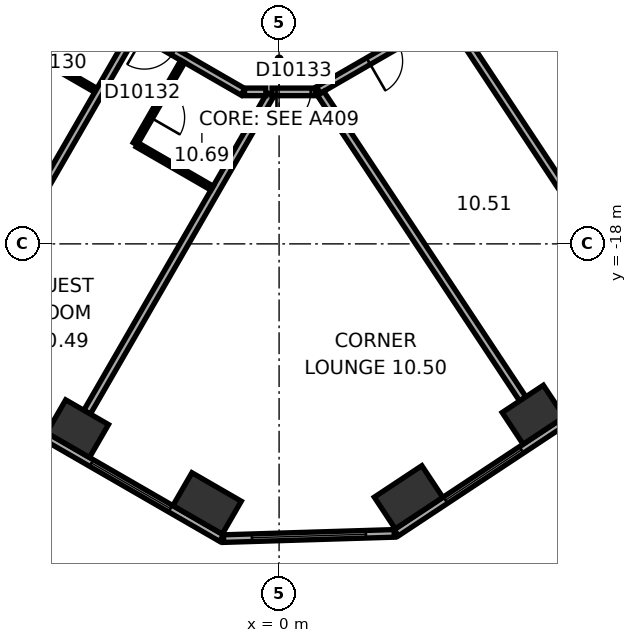
"""IFC4 building model, lengths in metres.
Left out: names, types, materials, properties, quantities, classifications, styles, units other than length and angle.
Written with IfcOpenShell. Run it as: python <this file> out.ifc"""

import sys

from ifc_helpers import new_model, si_unit, direction, frame, frame_2d, origin, origin_2d, place, context, subcontext, project, spatial, rectangle, extrude, element, fill, save


model = new_model("IFC4")
c1 = context("Model", 3, precision=1e-05, world=origin(), true_north=direction((0.0, 1.0)))
c2 = subcontext(c1, "Body", "Model", "MODEL_VIEW")
j1 = project(units=[si_unit("LENGTHUNIT", "METRE"), si_unit("PLANEANGLEUNIT", "RADIAN")], contexts=[c1])
p1 = place(None, origin())
s1 = spatial("IfcSite", under=j1, at=p1, CompositionType="ELEMENT")
p2 = place(p1, origin())
s2 = spatial("IfcBuilding", under=s1, at=p2, CompositionType="ELEMENT")
p3 = place(p2, frame((0.0, 0.0, 53.9)))
s3 = spatial("IfcBuildingStorey", under=s2, at=p3, CompositionType="ELEMENT", Elevation=53.9)
p4 = place(p3, frame((-5.302, -22.862, 0.0), z_axis=(0.0, 0.0, 1.0), x_axis=(0.866025403784, -0.5, 0.0)))
e1 = element("IfcColumn", 1, at=p4, inside=s3, PredefinedType="COLUMN", context=c2, shape_type="SweptSolid", body=[
    extrude(rectangle(XDim=1.3, YDim=1.0, at=origin_2d()), origin(), (0.0, 0.0, 1.0), 3.3),
])
for number, where, z_axis, x_axis in (
    (2, (-1.895, -24.829, 0.0), (0.0, 0.0, 1.0), (0.866, -0.5, 0.0)),
    (3, (3.407, -24.667, 0.0), (0.0, 0.0, 1.0), (0.834, 0.552, 0.0)),
):
    element("IfcColumn", number, at=place(p3, frame(where, z_axis=z_axis, x_axis=x_axis)), inside=s3, PredefinedType="COLUMN", context=c2, shape_type="SweptSolid", body=[
        extrude(rectangle(XDim=1.5, YDim=1.0, at=origin_2d()), origin(), (0.0, 0.0, 1.0), 3.3),
    ])
p5 = place(p3, frame((6.688, -22.496, 0.0), z_axis=(0.0, 0.0, 1.0), x_axis=(0.833885822067, 0.551936985312, 0.0)))
e4 = element("IfcColumn", 4, at=p5, inside=s3, PredefinedType="COLUMN", context=c2, shape_type="SweptSolid", body=[
    extrude(rectangle(XDim=1.3, YDim=1.0, at=origin_2d()), origin(), (0.0, 0.0, 1.0), 3.3),
])
p6 = place(p3, frame((-19.914, -15.119, 0.0), z_axis=(0.0, 0.0, 1.0), x_axis=(0.866025418898, -0.499999973822, 0.0)))
e5 = element("IfcWall", 5, at=p6, inside=s3, PredefinedType="STANDARD", context=c2, shape_type="SweptSolid", body=[
    extrude(rectangle(XDim=21.246, YDim=0.2, at=frame_2d((10.623, 0.0))), origin(), (0.0, 0.0, 1.0), 3.3),
])
p7 = place(p6, frame((1.555, 0.0, 0.8)))
e6 = element("IfcOpeningElement", 6, at=p7, cuts=e5, PredefinedType="OPENING", context=c2, shape_type="SweptSolid", body=[
    extrude(rectangle(XDim=2.4, YDim=1.7, at=frame_2d((1.2, 0.85))), frame((0.0, 0.11, 0.0), z_axis=(0.0, -1.0, 0.0), x_axis=(1.0, 0.0, 0.0)), (0.0, 0.0, 1.0), 0.22),
])
p8 = place(p6, frame((5.489, 0.0, 0.8)))
e7 = element("IfcOpeningElement", 7, at=p8, cuts=e5, PredefinedType="OPENING", context=c2, shape_type="SweptSolid", body=[
    extrude(rectangle(XDim=2.4, YDim=1.7, at=frame_2d((1.2, 0.85))), frame((0.0, 0.11, 0.0), z_axis=(0.0, -1.0, 0.0), x_axis=(1.0, 0.0, 0.0)), (0.0, 0.0, 1.0), 0.22),
])
p9 = place(p6, frame((9.424, 0.0, 0.8)))
e8 = element("IfcOpeningElement", 8, at=p9, cuts=e5, PredefinedType="OPENING", context=c2, shape_type="SweptSolid", body=[
    extrude(rectangle(XDim=2.4, YDim=1.7, at=frame_2d((1.2, 0.85))), frame((0.0, 0.11, 0.0), z_axis=(0.0, -1.0, 0.0), x_axis=(1.0, 0.0, 0.0)), (0.0, 0.0, 1.0), 0.22),
])
p10 = place(p6, frame((13.358, 0.0, 0.8)))
e9 = element("IfcOpeningElement", 9, at=p10, cuts=e5, PredefinedType="OPENING", context=c2, shape_type="SweptSolid", body=[
    extrude(rectangle(XDim=2.4, YDim=1.7, at=frame_2d((1.2, 0.85))), frame((0.0, 0.11, 0.0), z_axis=(0.0, -1.0, 0.0), x_axis=(1.0, 0.0, 0.0)), (0.0, 0.0, 1.0), 0.22),
])
p11 = place(p6, frame((17.293, 0.0, 0.8)))
e10 = element("IfcOpeningElement", 10, at=p11, cuts=e5, PredefinedType="OPENING", context=c2, shape_type="SweptSolid", body=[
    extrude(rectangle(XDim=2.4, YDim=1.7, at=frame_2d((1.2, 0.85))), frame((0.0, 0.11, 0.0), z_axis=(0.0, -1.0, 0.0), x_axis=(1.0, 0.0, 0.0)), (0.0, 0.0, 1.0), 0.22),
])
p12 = place(p3, frame((-1.461, -25.755, 0.0), z_axis=(0.0, 0.0, 1.0), x_axis=(0.999533823446, 0.030530898895, 0.0)))
e11 = element("IfcWall", 11, at=p12, inside=s3, PredefinedType="STANDARD", context=c2, shape_type="SweptSolid", body=[
    extrude(rectangle(XDim=4.494, YDim=0.2, at=frame_2d((2.247, 0.0))), origin(), (0.0, 0.0, 1.0), 3.3),
])
p13 = place(p12, frame((0.747, 0.0, 0.8)))
e12 = element("IfcOpeningElement", 12, at=p13, cuts=e11, PredefinedType="OPENING", context=c2, shape_type="SweptSolid", body=[
    extrude(rectangle(XDim=3.0, YDim=1.7, at=frame_2d((1.5, 0.85))), frame((0.0, 0.11, 0.0), z_axis=(0.0, -1.0, 0.0), x_axis=(1.0, 0.0, 0.0)), (0.0, 0.0, 1.0), 0.22),
])
p14 = place(p3, frame((3.083, -25.601, 0.0), z_axis=(0.0, 0.0, 1.0), x_axis=(0.833884295743, 0.551939291329, 0.0)))
e13 = element("IfcWall", 13, at=p14, inside=s3, PredefinedType="STANDARD", context=c2, shape_type="SweptSolid", body=[
    extrude(rectangle(XDim=21.246, YDim=0.2, at=frame_2d((10.623, 0.0))), origin(), (0.0, 0.0, 1.0), 3.3),
])
p15 = place(p14, frame((1.553, 0.0, 0.8)))
e14 = element("IfcOpeningElement", 14, at=p15, cuts=e13, PredefinedType="OPENING", context=c2, shape_type="SweptSolid", body=[
    extrude(rectangle(XDim=2.4, YDim=1.7, at=frame_2d((1.2, 0.85))), frame((0.0, 0.11, 0.0), z_axis=(0.0, -1.0, 0.0), x_axis=(1.0, 0.0, 0.0)), (0.0, 0.0, 1.0), 0.22),
])
p16 = place(p14, frame((5.488, 0.0, 0.8)))
e15 = element("IfcOpeningElement", 15, at=p16, cuts=e13, PredefinedType="OPENING", context=c2, shape_type="SweptSolid", body=[
    extrude(rectangle(XDim=2.4, YDim=1.7, at=frame_2d((1.2, 0.85))), frame((0.0, 0.11, 0.0), z_axis=(0.0, -1.0, 0.0), x_axis=(1.0, 0.0, 0.0)), (0.0, 0.0, 1.0), 0.22),
])
p17 = place(p14, frame((9.422, 0.0, 0.8)))
e16 = element("IfcOpeningElement", 16, at=p17, cuts=e13, PredefinedType="OPENING", context=c2, shape_type="SweptSolid", body=[
    extrude(rectangle(XDim=2.4, YDim=1.7, at=frame_2d((1.2, 0.85))), frame((0.0, 0.11, 0.0), z_axis=(0.0, -1.0, 0.0), x_axis=(1.0, 0.0, 0.0)), (0.0, 0.0, 1.0), 0.22),
])
p18 = place(p14, frame((13.357, 0.0, 0.8)))
e17 = element("IfcOpeningElement", 17, at=p18, cuts=e13, PredefinedType="OPENING", context=c2, shape_type="SweptSolid", body=[
    extrude(rectangle(XDim=2.4, YDim=1.7, at=frame_2d((1.2, 0.85))), frame((0.0, 0.11, 0.0), z_axis=(0.0, -1.0, 0.0), x_axis=(1.0, 0.0, 0.0)), (0.0, 0.0, 1.0), 0.22),
])
p19 = place(p14, frame((17.291, 0.0, 0.8)))
e18 = element("IfcOpeningElement", 18, at=p19, cuts=e13, PredefinedType="OPENING", context=c2, shape_type="SweptSolid", body=[
    extrude(rectangle(XDim=2.4, YDim=1.7, at=frame_2d((1.2, 0.85))), frame((0.0, 0.11, 0.0), z_axis=(0.0, -1.0, 0.0), x_axis=(1.0, 0.0, 0.0)), (0.0, 0.0, 1.0), 0.22),
])
p20 = place(p3, frame((-11.615, -7.843, 0.0), z_axis=(0.0, 0.0, 1.0), x_axis=(0.866026466995, -0.499998158461, 0.0)))
e19 = element("IfcWall", 19, at=p20, inside=s3, PredefinedType="PARTITIONING", context=c2, shape_type="SweptSolid", body=[
    extrude(rectangle(XDim=12.315, YDim=0.2, at=frame_2d((6.158, 0.0))), origin(), (0.0, 0.0, 1.0), 3.05),
])
p21 = place(p20, frame((4.608, 0.0, 0.0)))
e20 = element("IfcOpeningElement", 20, at=p21, cuts=e19, PredefinedType="OPENING", context=c2, shape_type="SweptSolid", body=[
    extrude(rectangle(XDim=1.0, YDim=2.1, at=frame_2d((0.5, 1.05))), frame((0.0, 0.11, 0.0), z_axis=(0.0, -1.0, 0.0), x_axis=(1.0, 0.0, 0.0)), (0.0, 0.0, 1.0), 0.22),
])
p22 = place(p20, frame((9.317, 0.0, 0.0)))
e21 = element("IfcOpeningElement", 21, at=p22, cuts=e19, PredefinedType="OPENING", context=c2, shape_type="SweptSolid", body=[
    extrude(rectangle(XDim=0.9, YDim=2.1, at=frame_2d((0.45, 1.05))), frame((0.0, 0.11, 0.0), z_axis=(0.0, -1.0, 0.0), x_axis=(1.0, 0.0, 0.0)), (0.0, 0.0, 1.0), 0.22),
])
p23 = place(p3, frame((-11.463, -10.125, 0.0), z_axis=(0.0, 0.0, 1.0), x_axis=(0.866014882148, -0.500018223566, 0.0)))
e22 = element("IfcWall", 22, at=p23, inside=s3, PredefinedType="PARTITIONING", context=c2, shape_type="SweptSolid", body=[
    extrude(rectangle(XDim=7.669, YDim=0.12, at=frame_2d((3.834, 0.0))), origin(), (0.0, 0.0, 1.0), 3.05),
])
p24 = place(p23, frame((0.55, 0.0, 0.0)))
e23 = element("IfcOpeningElement", 23, at=p24, cuts=e22, PredefinedType="OPENING", context=c2, shape_type="SweptSolid", body=[
    extrude(rectangle(XDim=1.0, YDim=2.1, at=frame_2d((0.5, 1.05))), frame((0.0, 0.07, 0.0), z_axis=(0.0, -1.0, 0.0), x_axis=(1.0, 0.0, 0.0)), (0.0, 0.0, 1.0), 0.14),
])
p25 = place(p23, frame((2.7, 0.0, 0.0)))
e24 = element("IfcOpeningElement", 24, at=p25, cuts=e22, PredefinedType="OPENING", context=c2, shape_type="SweptSolid", body=[
    extrude(rectangle(XDim=0.9, YDim=2.1, at=frame_2d((0.45, 1.05))), frame((0.0, 0.07, 0.0), z_axis=(0.0, -1.0, 0.0), x_axis=(1.0, 0.0, 0.0)), (0.0, 0.0, 1.0), 0.14),
])
p26 = place(p23, frame((5.485, 0.0, 0.0)))
e25 = element("IfcOpeningElement", 25, at=p26, cuts=e22, PredefinedType="OPENING", context=c2, shape_type="SweptSolid", body=[
    extrude(rectangle(XDim=0.9, YDim=2.1, at=frame_2d((0.45, 1.05))), frame((0.0, 0.07, 0.0), z_axis=(0.0, -1.0, 0.0), x_axis=(1.0, 0.0, 0.0)), (0.0, 0.0, 1.0), 0.14),
])
p27 = place(p3, frame((-8.46, -20.461, 0.0), z_axis=(0.0, 0.0, 1.0), x_axis=(0.499999662836, 0.866025598446, 0.0)))
e26 = element("IfcWall", 26, at=p27, inside=s3, PredefinedType="PARTITIONING", context=c2, shape_type="SweptSolid", body=[
    extrude(rectangle(XDim=9.25, YDim=0.2, at=frame_2d((4.625, 0.0))), origin(), (0.0, 0.0, 1.0), 3.05),
])
p28 = place(p3, frame((-5.052, -22.429, 0.0), z_axis=(0.0, 0.0, 1.0), x_axis=(0.50000569793, 0.866022114058, 0.0)))
e27 = element("IfcWall", 27, at=p28, inside=s3, PredefinedType="PARTITIONING", context=c2, shape_type="SweptSolid", body=[
    extrude(rectangle(XDim=9.65, YDim=0.2, at=frame_2d((4.825, 0.0))), origin(), (0.0, 0.0, 1.0), 3.05),
])
p29 = place(p3, frame((-3.786, -15.366, 0.0), z_axis=(0.0, 0.0, 1.0), x_axis=(0.500004234368, 0.866022959057, 0.0)))
e28 = element("IfcWall", 28, at=p29, inside=s3, PredefinedType="PARTITIONING", context=c2, shape_type="SweptSolid", body=[
    extrude(rectangle(XDim=2.5, YDim=0.12, at=frame_2d((1.25, 0.0))), origin(), (0.0, 0.0, 1.0), 3.05),
])
p30 = place(p29, frame((0.8, 0.0, 0.0)))
e29 = element("IfcOpeningElement", 29, at=p30, cuts=e28, PredefinedType="OPENING", context=c2, shape_type="SweptSolid", body=[
    extrude(rectangle(XDim=0.9, YDim=2.1, at=frame_2d((0.45, 1.05))), frame((0.0, 0.07, 0.0), z_axis=(0.0, -1.0, 0.0), x_axis=(1.0, 0.0, 0.0)), (0.0, 0.0, 1.0), 0.14),
])
p31 = place(p3, frame((-1.764, -16.533, 0.0), z_axis=(0.0, 0.0, 1.0), x_axis=(-0.866008641419, 0.500029032144, 0.0)))
e30 = element("IfcWall", 30, at=p31, inside=s3, PredefinedType="PARTITIONING", context=c2, shape_type="SweptSolid", body=[
    extrude(rectangle(XDim=2.275, YDim=0.12, at=frame_2d((1.137, 0.0))), origin(), (0.0, 0.0, 1.0), 3.05),
])
p32 = place(p3, frame((-0.91, -14.001, 0.0), z_axis=(0.0, 0.0, 1.0), x_axis=(1.0, 0.0, 0.0)))
e31 = element("IfcWall", 31, at=p32, inside=s3, PredefinedType="PARTITIONING", context=c2, shape_type="SweptSolid", body=[
    extrude(rectangle(XDim=0.56, YDim=0.2, at=frame_2d((0.28, 0.0))), origin(), (0.0, 0.0, 1.0), 3.05),
])
p33 = place(p3, frame((-0.186, -14.001, 0.0), z_axis=(0.0, 0.0, 1.0), x_axis=(1.0, 0.0, 0.0)))
e32 = element("IfcWall", 32, at=p33, inside=s3, PredefinedType="PARTITIONING", context=c2, shape_type="SweptSolid", body=[
    extrude(rectangle(XDim=1.136, YDim=0.2, at=frame_2d((0.568, 0.0))), origin(), (0.0, 0.0, 1.0), 3.05),
])
p34 = place(p33, frame((0.118, 0.0, 0.0)))
e33 = element("IfcOpeningElement", 33, at=p34, cuts=e32, PredefinedType="OPENING", context=c2, shape_type="SweptSolid", body=[
    extrude(rectangle(XDim=0.9, YDim=2.1, at=frame_2d((0.45, 1.05))), frame((0.0, 0.11, 0.0), z_axis=(0.0, -1.0, 0.0), x_axis=(1.0, 0.0, 0.0)), (0.0, 0.0, 1.0), 0.22),
])
p35 = place(p3, frame((1.033, -13.953, 0.0), z_axis=(0.0, 0.0, 1.0), x_axis=(0.866017531406, 0.500013635111, 0.0)))
e34 = element("IfcWall", 34, at=p35, inside=s3, PredefinedType="PARTITIONING", context=c2, shape_type="SweptSolid", body=[
    extrude(rectangle(XDim=6.58, YDim=0.2, at=frame_2d((3.29, 0.0))), origin(), (0.0, 0.0, 1.0), 3.05),
])
p36 = place(p35, frame((1.521, 0.0, 0.0)))
e35 = element("IfcOpeningElement", 35, at=p36, cuts=e34, PredefinedType="OPENING", context=c2, shape_type="SweptSolid", body=[
    extrude(rectangle(XDim=0.9, YDim=2.1, at=frame_2d((0.45, 1.05))), frame((0.0, 0.11, 0.0), z_axis=(0.0, -1.0, 0.0), x_axis=(1.0, 0.0, 0.0)), (0.0, 0.0, 1.0), 0.22),
])
p37 = place(p35, frame((4.811, 0.0, 0.0)))
e36 = element("IfcOpeningElement", 36, at=p37, cuts=e34, PredefinedType="OPENING", context=c2, shape_type="SweptSolid", body=[
    extrude(rectangle(XDim=0.9, YDim=2.1, at=frame_2d((0.45, 1.05))), frame((0.0, 0.11, 0.0), z_axis=(0.0, -1.0, 0.0), x_axis=(1.0, 0.0, 0.0)), (0.0, 0.0, 1.0), 0.22),
])
p38 = place(p3, frame((6.412, -22.079, 0.0), z_axis=(0.0, 0.0, 1.0), x_axis=(-0.551919507115, 0.83389739037, 0.0)))
e37 = element("IfcWall", 37, at=p38, inside=s3, PredefinedType="PARTITIONING", context=c2, shape_type="SweptSolid", body=[
    extrude(rectangle(XDim=9.635, YDim=0.2, at=frame_2d((4.817, 0.0))), origin(), (0.0, 0.0, 1.0), 3.05),
])
p39 = place(p3, frame((8.733, -14.127, 0.0), z_axis=(0.0, 0.0, 1.0), x_axis=(-0.499978132246, 0.86603802877, 0.0)))
e38 = element("IfcWall", 38, at=p39, inside=s3, PredefinedType="PARTITIONING", context=c2, shape_type="SweptSolid", body=[
    extrude(rectangle(XDim=2.921, YDim=0.12, at=frame_2d((1.46, 0.0))), origin(), (0.0, 0.0, 1.0), 3.05),
])
p40 = place(p39, frame((1.01, 0.0, 0.0)))
e39 = element("IfcOpeningElement", 39, at=p40, cuts=e38, PredefinedType="OPENING", context=c2, shape_type="SweptSolid", body=[
    extrude(rectangle(XDim=0.9, YDim=2.1, at=frame_2d((0.45, 1.05))), frame((0.0, 0.07, 0.0), z_axis=(0.0, -1.0, 0.0), x_axis=(1.0, 0.0, 0.0)), (0.0, 0.0, 1.0), 0.14),
])
p41 = place(p3, frame((9.693, -19.907, 0.0), z_axis=(0.0, 0.0, 1.0), x_axis=(-0.551938394837, 0.833884889121, 0.0)))
e40 = element("IfcWall", 40, at=p41, inside=s3, PredefinedType="PARTITIONING", context=c2, shape_type="SweptSolid", body=[
    extrude(rectangle(XDim=9.394, YDim=0.2, at=frame_2d((4.697, 0.0))), origin(), (0.0, 0.0, 1.0), 2.6),
])
p42 = place(p11, origin())
e41 = element("IfcWindow", 41, at=p42, inside=s3, PartitioningType="SINGLE_PANEL", PredefinedType="WINDOW", context=c2, shape_type="SweptSolid", body=[
    extrude(rectangle(XDim=2.4, YDim=1.7, at=frame_2d((1.2, 0.85))), frame((0.0, 0.03, 0.0), z_axis=(0.0, -1.0, 0.0), x_axis=(1.0, 0.0, 0.0)), (0.0, 0.0, 1.0), 0.06),
])
fill(e10, e41)
p43 = place(p13, origin())
e42 = element("IfcWindow", 42, at=p43, inside=s3, PartitioningType="SINGLE_PANEL", PredefinedType="WINDOW", context=c2, shape_type="SweptSolid", body=[
    extrude(rectangle(XDim=3.0, YDim=1.7, at=frame_2d((1.5, 0.85))), frame((0.0, 0.03, 0.0), z_axis=(0.0, -1.0, 0.0), x_axis=(1.0, 0.0, 0.0)), (0.0, 0.0, 1.0), 0.06),
])
fill(e12, e42)
p44 = place(p15, origin())
e43 = element("IfcWindow", 43, at=p44, inside=s3, PartitioningType="SINGLE_PANEL", PredefinedType="WINDOW", context=c2, shape_type="SweptSolid", body=[
    extrude(rectangle(XDim=2.4, YDim=1.7, at=frame_2d((1.2, 0.85))), frame((0.0, 0.03, 0.0), z_axis=(0.0, -1.0, 0.0), x_axis=(1.0, 0.0, 0.0)), (0.0, 0.0, 1.0), 0.06),
])
fill(e14, e43)
p45 = place(p26, origin())
e44 = element("IfcDoor", 44, at=p45, inside=s3, OperationType="SINGLE_SWING_LEFT", PredefinedType="DOOR", context=c2, shape_type="SweptSolid", body=[
    extrude(rectangle(XDim=0.9, YDim=2.1, at=frame_2d((0.45, 1.05))), frame((0.0, 0.025, 0.0), z_axis=(0.0, -1.0, 0.0), x_axis=(1.0, 0.0, 0.0)), (0.0, 0.0, 1.0), 0.05),
])
fill(e25, e44)
p46 = place(p22, origin())
e45 = element("IfcDoor", 45, at=p46, inside=s3, OperationType="SINGLE_SWING_LEFT", PredefinedType="DOOR", context=c2, shape_type="SweptSolid", body=[
    extrude(rectangle(XDim=0.9, YDim=2.1, at=frame_2d((0.45, 1.05))), frame((0.0, 0.025, 0.0), z_axis=(0.0, -1.0, 0.0), x_axis=(1.0, 0.0, 0.0)), (0.0, 0.0, 1.0), 0.05),
])
fill(e21, e45)
p47 = place(p30, origin())
e46 = element("IfcDoor", 46, at=p47, inside=s3, OperationType="SINGLE_SWING_LEFT", PredefinedType="DOOR", context=c2, shape_type="SweptSolid", body=[
    extrude(rectangle(XDim=0.9, YDim=2.1, at=frame_2d((0.45, 1.05))), frame((0.0, 0.025, 0.0), z_axis=(0.0, -1.0, 0.0), x_axis=(1.0, 0.0, 0.0)), (0.0, 0.0, 1.0), 0.05),
])
fill(e29, e46)
p48 = place(p34, origin())
e47 = element("IfcDoor", 47, at=p48, inside=s3, OperationType="SINGLE_SWING_LEFT", PredefinedType="DOOR", context=c2, shape_type="SweptSolid", body=[
    extrude(rectangle(XDim=0.9, YDim=2.1, at=frame_2d((0.45, 1.05))), frame((0.0, 0.025, 0.0), z_axis=(0.0, -1.0, 0.0), x_axis=(1.0, 0.0, 0.0)), (0.0, 0.0, 1.0), 0.05),
])
fill(e33, e47)
p49 = place(p36, origin())
e48 = element("IfcDoor", 48, at=p49, inside=s3, OperationType="SINGLE_SWING_LEFT", PredefinedType="DOOR", context=c2, shape_type="SweptSolid", body=[
    extrude(rectangle(XDim=0.9, YDim=2.1, at=frame_2d((0.45, 1.05))), frame((0.0, 0.025, 0.0), z_axis=(0.0, -1.0, 0.0), x_axis=(1.0, 0.0, 0.0)), (0.0, 0.0, 1.0), 0.05),
])
fill(e35, e48)
save(model, sys.argv[1])
